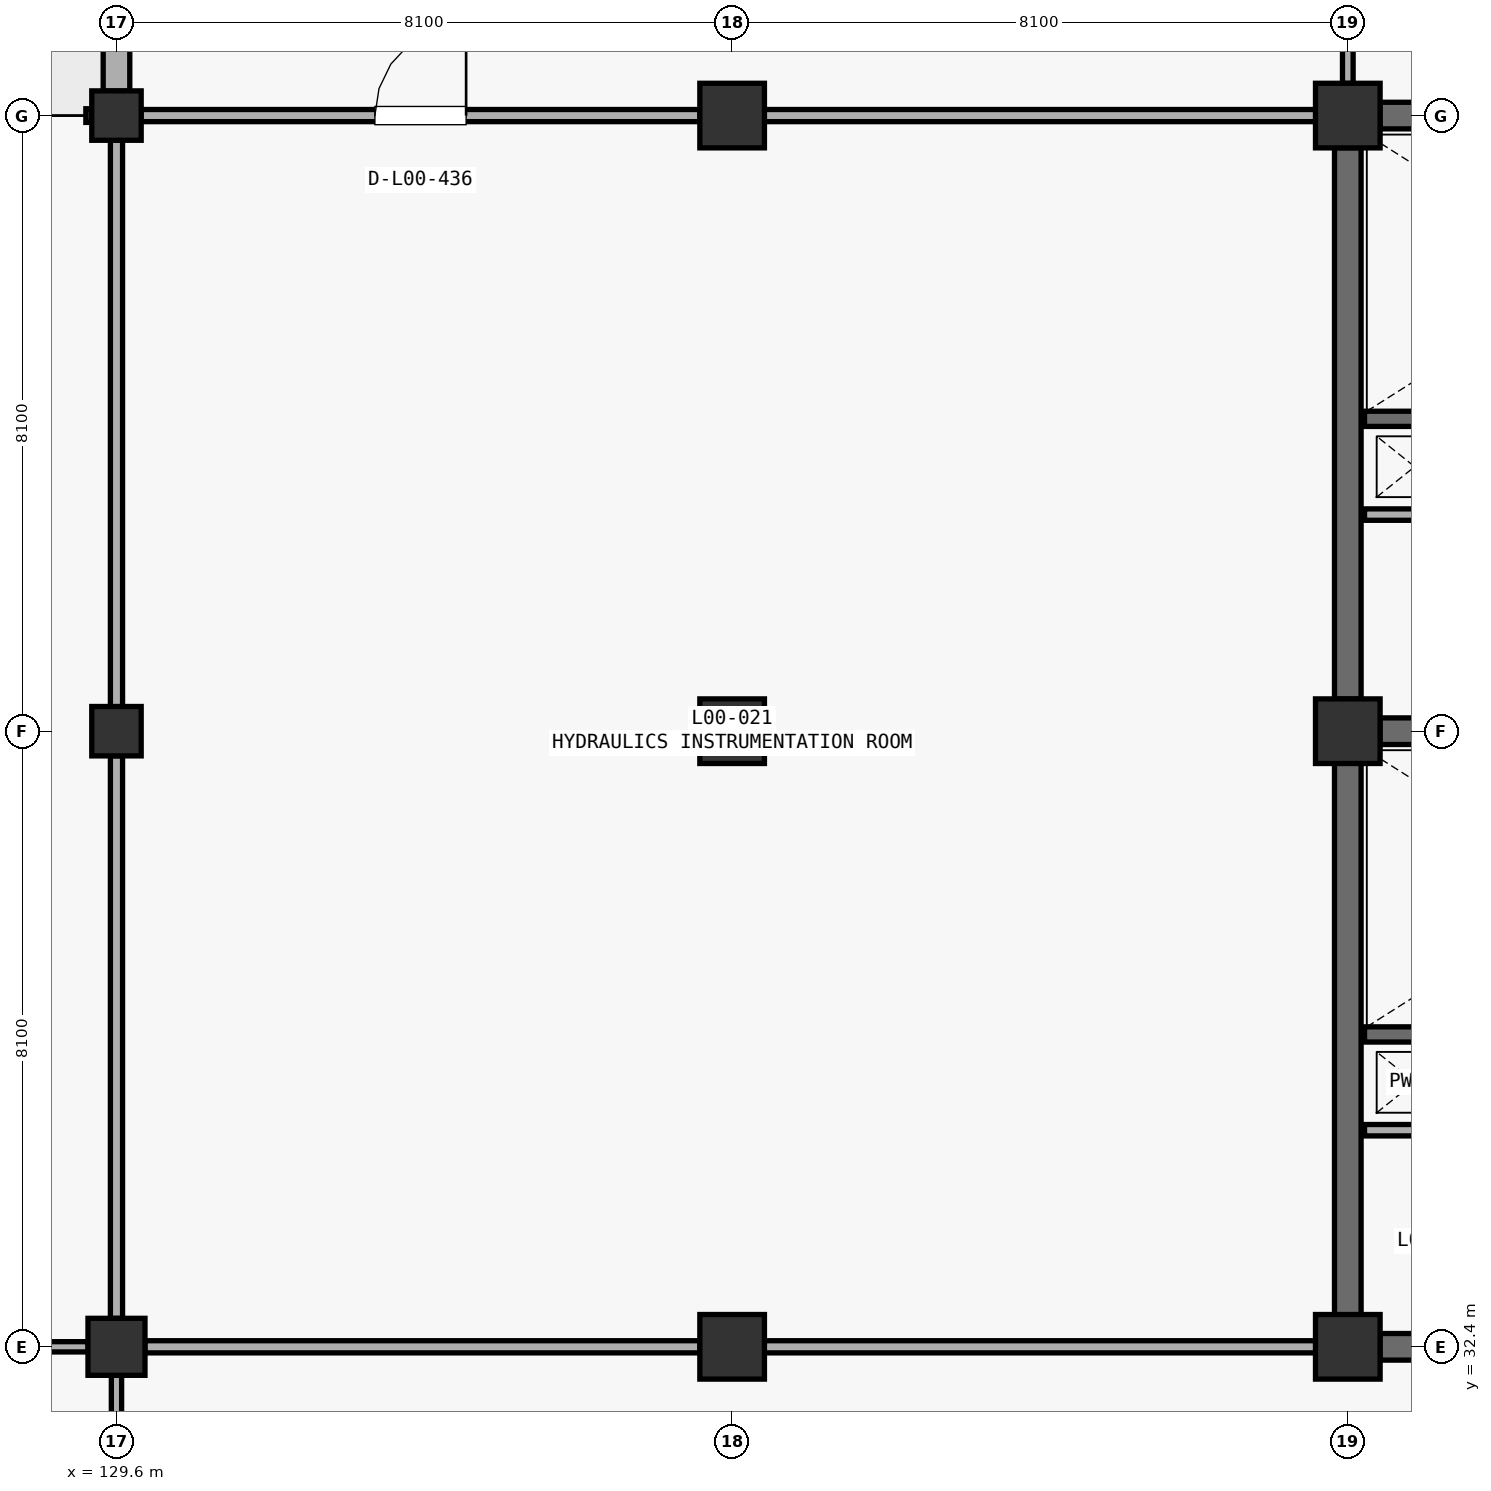
"""IFC4 building model, lengths in metres.
Left out: names, types, materials, properties, quantities, classifications, styles, units other than length and angle.
Written with IfcOpenShell. Run it as: python <this file> out.ifc"""

import sys

from ifc_helpers import new_model, si_unit, direction, frame, frame_2d, origin, origin_2d, place, context, subcontext, project, spatial, rectangle, circle, extrude, element, fill, save


model = new_model("IFC4")
c1 = context("Model", 3, precision=1e-05, world=origin(), true_north=direction((0.0, 1.0)))
c2 = subcontext(c1, "Body", "Model", "MODEL_VIEW")
j1 = project(units=[si_unit("LENGTHUNIT", "METRE"), si_unit("PLANEANGLEUNIT", "RADIAN")], contexts=[c1])
p1 = place(None, origin())
s1 = spatial("IfcSite", under=j1, at=p1, CompositionType="ELEMENT")
p2 = place(p1, origin())
s2 = spatial("IfcBuilding", under=s1, at=p2, CompositionType="ELEMENT")
p3 = place(p2, origin())
s3 = spatial("IfcBuildingStorey", under=s2, at=p3, CompositionType="ELEMENT", Elevation=0.0)
p4 = place(p3, frame((129.6, 32.4, 0.0), z_axis=(0.0, 0.0, 1.0), x_axis=(1.0, 0.0, 0.0)))
e1 = element("IfcColumn", 1, at=p4, inside=s3, PredefinedType="COLUMN", context=c2, shape_type="SweptSolid", body=[
    extrude(circle(Radius=0.375, at=origin_2d()), origin(), (0.0, 0.0, 1.0), 5.1),
])
for number, where, z_axis, x_axis in (
    (2, (129.6, 40.5, 0.0), (0.0, 0.0, 1.0), (1.0, 0.0, 0.0)),
    (3, (129.6, 48.6, 0.0), (0.0, 0.0, 1.0), (1.0, 0.0, 0.0)),
):
    element("IfcColumn", number, at=place(p3, frame(where, z_axis=z_axis, x_axis=x_axis)), inside=s3, PredefinedType="COLUMN", context=c2, shape_type="SweptSolid", body=[
        extrude(rectangle(XDim=0.65, YDim=0.65, at=origin_2d()), origin(), (0.0, 0.0, 1.0), 5.1),
    ])
for number, where, z_axis, x_axis in (
    (4, (137.7, 32.4, 0.0), (0.0, 0.0, 1.0), (1.0, 0.0, 0.0)),
    (5, (137.7, 40.5, 0.0), (0.0, 0.0, 1.0), (1.0, 0.0, 0.0)),
    (6, (137.7, 48.6, 0.0), (0.0, 0.0, 1.0), (1.0, 0.0, 0.0)),
    (7, (145.8, 32.4, 0.0), (0.0, 0.0, 1.0), (1.0, 0.0, 0.0)),
    (8, (145.8, 40.5, 0.0), (0.0, 0.0, 1.0), (1.0, 0.0, 0.0)),
    (9, (145.8, 48.6, 0.0), (0.0, 0.0, 1.0), (1.0, 0.0, 0.0)),
):
    element("IfcColumn", number, at=place(p3, frame(where, z_axis=z_axis, x_axis=x_axis)), inside=s3, PredefinedType="COLUMN", context=c2, shape_type="SweptSolid", body=[
        extrude(rectangle(XDim=0.85, YDim=0.85, at=origin_2d()), origin(), (0.0, 0.0, 1.0), 5.1),
    ])
p5 = place(p3, frame((129.6, 48.923, 0.0), z_axis=(0.0, 0.0, 1.0), x_axis=(0.0, 1.0, 0.0)))
e10 = element("IfcWall", 10, at=p5, inside=s3, PredefinedType="STANDARD", context=c2, shape_type="SweptSolid", body=[
    extrude(rectangle(XDim=7.454, YDim=0.35, at=frame_2d((3.727, 0.0))), origin(), (0.0, 0.0, 1.0), 3.872),
])
p6 = place(p5, frame((3.027, 0.0, 0.85)))
e11 = element("IfcOpeningElement", 11, at=p6, cuts=e10, PredefinedType="OPENING", context=c2, shape_type="SweptSolid", body=[
    extrude(rectangle(XDim=1.4, YDim=1.9, at=frame_2d((0.7, 0.95))), frame((0.0, 0.185, 0.0), z_axis=(0.0, -1.0, 0.0), x_axis=(1.0, 0.0, 0.0)), (0.0, 0.0, 1.0), 0.37),
])
p7 = place(p3, frame((146.223, 40.5, 0.0), z_axis=(0.0, 0.0, 1.0), x_axis=(1.0, 0.0, 0.0)))
e12 = element("IfcWall", 12, at=p7, inside=s3, PredefinedType="SHEAR", context=c2, shape_type="SweptSolid", body=[
    extrude(rectangle(XDim=7.254, YDim=0.35, at=frame_2d((3.627, 0.0))), origin(), (0.0, 0.0, 1.0), 4.822),
])
p8 = place(p3, frame((145.8, 32.823, 0.0), z_axis=(0.0, 0.0, 1.0), x_axis=(0.0, 1.0, 0.0)))
e13 = element("IfcWall", 13, at=p8, inside=s3, PredefinedType="SHEAR", context=c2, shape_type="SweptSolid", body=[
    extrude(rectangle(XDim=7.254, YDim=0.35, at=frame_2d((3.627, 0.0))), origin(), (0.0, 0.0, 1.0), 4.822),
])
p9 = place(p3, frame((146.223, 32.4, 0.0), z_axis=(0.0, 0.0, 1.0), x_axis=(1.0, 0.0, 0.0)))
e14 = element("IfcWall", 14, at=p9, inside=s3, PredefinedType="SHEAR", context=c2, shape_type="SweptSolid", body=[
    extrude(rectangle(XDim=7.254, YDim=0.35, at=frame_2d((3.627, 0.0))), origin(), (0.0, 0.0, 1.0), 4.822),
])
p10 = place(p3, frame((146.02, 36.51, 0.0), z_axis=(0.0, 0.0, 1.0), x_axis=(1.0, 0.0, 0.0)))
e15 = element("IfcWall", 15, at=p10, inside=s3, PredefinedType="SHEAR", context=c2, shape_type="SweptSolid", body=[
    extrude(rectangle(XDim=7.66, YDim=0.2, at=frame_2d((3.83, 0.0))), origin(), (0.0, 0.0, 1.0), 4.822),
])
p11 = place(p10, frame((6.11, 0.0, 0.0)))
e16 = element("IfcOpeningElement", 16, at=p11, cuts=e15, PredefinedType="OPENING", context=c2, shape_type="SweptSolid", body=[
    extrude(rectangle(XDim=1.15, YDim=2.2, at=frame_2d((0.575, 1.1))), frame((0.0, 0.11, 0.0), z_axis=(0.0, -1.0, 0.0), x_axis=(1.0, 0.0, 0.0)), (0.0, 0.0, 1.0), 0.22),
])
p12 = place(p3, frame((146.02, 35.25, 0.0), z_axis=(0.0, 0.0, 1.0), x_axis=(1.0, 0.0, 0.0)))
e17 = element("IfcWall", 17, at=p12, inside=s3, PredefinedType="PARTITIONING", context=c2, shape_type="SweptSolid", body=[
    extrude(rectangle(XDim=2.53, YDim=0.15, at=frame_2d((1.265, 0.0))), origin(), (0.0, 0.0, 1.0), 4.822),
])
p13 = place(p3, frame((146.223, 48.6, 0.0), z_axis=(0.0, 0.0, 1.0), x_axis=(1.0, 0.0, 0.0)))
e18 = element("IfcWall", 18, at=p13, inside=s3, PredefinedType="SHEAR", context=c2, shape_type="SweptSolid", body=[
    extrude(rectangle(XDim=7.254, YDim=0.35, at=frame_2d((3.627, 0.0))), origin(), (0.0, 0.0, 1.0), 4.822),
])
p14 = place(p3, frame((145.8, 40.923, 0.0), z_axis=(0.0, 0.0, 1.0), x_axis=(0.0, 1.0, 0.0)))
e19 = element("IfcWall", 19, at=p14, inside=s3, PredefinedType="SHEAR", context=c2, shape_type="SweptSolid", body=[
    extrude(rectangle(XDim=7.254, YDim=0.35, at=frame_2d((3.627, 0.0))), origin(), (0.0, 0.0, 1.0), 4.822),
])
p15 = place(p3, frame((146.02, 44.61, 0.0), z_axis=(0.0, 0.0, 1.0), x_axis=(1.0, 0.0, 0.0)))
e20 = element("IfcWall", 20, at=p15, inside=s3, PredefinedType="SHEAR", context=c2, shape_type="SweptSolid", body=[
    extrude(rectangle(XDim=7.66, YDim=0.2, at=frame_2d((3.83, 0.0))), origin(), (0.0, 0.0, 1.0), 4.822),
])
p16 = place(p15, frame((6.11, 0.0, 0.0)))
e21 = element("IfcOpeningElement", 21, at=p16, cuts=e20, PredefinedType="OPENING", context=c2, shape_type="SweptSolid", body=[
    extrude(rectangle(XDim=1.15, YDim=2.2, at=frame_2d((0.575, 1.1))), frame((0.0, 0.11, 0.0), z_axis=(0.0, -1.0, 0.0), x_axis=(1.0, 0.0, 0.0)), (0.0, 0.0, 1.0), 0.22),
])
p17 = place(p3, frame((146.02, 43.35, 0.0), z_axis=(0.0, 0.0, 1.0), x_axis=(1.0, 0.0, 0.0)))
e22 = element("IfcWall", 22, at=p17, inside=s3, PredefinedType="PARTITIONING", context=c2, shape_type="SweptSolid", body=[
    extrude(rectangle(XDim=2.53, YDim=0.15, at=frame_2d((1.265, 0.0))), origin(), (0.0, 0.0, 1.0), 4.822),
])
p18 = place(p3, frame((145.8, 49.023, 0.0), z_axis=(0.0, 0.0, 1.0), x_axis=(0.0, 1.0, 0.0)))
e23 = element("IfcWall", 23, at=p18, inside=s3, PredefinedType="PARTITIONING", context=c2, shape_type="SweptSolid", body=[
    extrude(rectangle(XDim=7.254, YDim=0.14, at=frame_2d((3.627, 0.0))), origin(), (0.0, 0.0, 1.0), 3.97),
])
p19 = place(p3, frame((121.823, 32.4, 0.0), z_axis=(0.0, 0.0, 1.0), x_axis=(1.0, 0.0, 0.0)))
e24 = element("IfcWall", 24, at=p19, inside=s3, PredefinedType="PARTITIONING", context=c2, shape_type="SweptSolid", body=[
    extrude(rectangle(XDim=7.404, YDim=0.135, at=frame_2d((3.702, 0.0))), origin(), (0.0, 0.0, 1.0), 4.273),
])
p20 = place(p3, frame((129.6, 24.623, 0.0), z_axis=(0.0, 0.0, 1.0), x_axis=(0.0, 1.0, 0.0)))
e25 = element("IfcWall", 25, at=p20, inside=s3, PredefinedType="PARTITIONING", context=c2, shape_type="SweptSolid", body=[
    extrude(rectangle(XDim=7.404, YDim=0.135, at=frame_2d((3.702, 0.0))), origin(), (0.0, 0.0, 1.0), 4.172),
])
p21 = place(p3, frame((129.973, 32.4, 0.0), z_axis=(0.0, 0.0, 1.0), x_axis=(1.0, 0.0, 0.0)))
e26 = element("IfcWall", 26, at=p21, inside=s3, PredefinedType="PARTITIONING", context=c2, shape_type="SweptSolid", body=[
    extrude(rectangle(XDim=7.304, YDim=0.16, at=frame_2d((3.652, 0.0))), origin(), (0.0, 0.0, 1.0), 4.172),
])
p22 = place(p3, frame((138.123, 32.4, 0.0), z_axis=(0.0, 0.0, 1.0), x_axis=(1.0, 0.0, 0.0)))
e27 = element("IfcWall", 27, at=p22, inside=s3, PredefinedType="PARTITIONING", context=c2, shape_type="SweptSolid", body=[
    extrude(rectangle(XDim=7.254, YDim=0.16, at=frame_2d((3.627, 0.0))), origin(), (0.0, 0.0, 1.0), 4.222),
])
p23 = place(p3, frame((129.923, 48.6, 0.0), z_axis=(0.0, 0.0, 1.0), x_axis=(1.0, 0.0, 0.0)))
e28 = element("IfcWall", 28, at=p23, inside=s3, PredefinedType="PARTITIONING", context=c2, shape_type="SweptSolid", body=[
    extrude(rectangle(XDim=7.354, YDim=0.16, at=frame_2d((3.677, 0.0))), origin(), (0.0, 0.0, 1.0), 3.972),
])
p24 = place(p23, frame((3.077, 0.0, 0.0)))
e29 = element("IfcOpeningElement", 29, at=p24, cuts=e28, PredefinedType="OPENING", context=c2, shape_type="SweptSolid", body=[
    extrude(rectangle(XDim=1.2, YDim=2.2, at=frame_2d((0.6, 1.1))), frame((0.0, 0.09, 0.0), z_axis=(0.0, -1.0, 0.0), x_axis=(1.0, 0.0, 0.0)), (0.0, 0.0, 1.0), 0.18),
])
p25 = place(p3, frame((138.123, 48.6, 0.0), z_axis=(0.0, 0.0, 1.0), x_axis=(1.0, 0.0, 0.0)))
e30 = element("IfcWall", 30, at=p25, inside=s3, PredefinedType="PARTITIONING", context=c2, shape_type="SweptSolid", body=[
    extrude(rectangle(XDim=7.254, YDim=0.16, at=frame_2d((3.627, 0.0))), origin(), (0.0, 0.0, 1.0), 3.872),
])
p26 = place(p3, frame((129.6, 32.773, 0.0), z_axis=(0.0, 0.0, 1.0), x_axis=(0.0, 1.0, 0.0)))
e31 = element("IfcWall", 31, at=p26, inside=s3, PredefinedType="PARTITIONING", context=c2, shape_type="SweptSolid", body=[
    extrude(rectangle(XDim=7.404, YDim=0.16, at=frame_2d((3.702, 0.0))), origin(), (0.0, 0.0, 1.0), 4.222),
])
p27 = place(p3, frame((129.6, 40.823, 0.0), z_axis=(0.0, 0.0, 1.0), x_axis=(0.0, 1.0, 0.0)))
e32 = element("IfcWall", 32, at=p27, inside=s3, PredefinedType="PARTITIONING", context=c2, shape_type="SweptSolid", body=[
    extrude(rectangle(XDim=7.454, YDim=0.16, at=frame_2d((3.727, 0.0))), origin(), (0.0, 0.0, 1.0), 3.972),
])
p28 = place(p24, origin())
e33 = element("IfcDoor", 33, at=p28, inside=s3, OperationType="SINGLE_SWING_RIGHT", PredefinedType="DOOR", context=c2, shape_type="SweptSolid", body=[
    extrude(rectangle(XDim=1.2, YDim=2.2, at=frame_2d((0.6, 1.1))), frame((0.0, 0.025, 0.0), z_axis=(0.0, -1.0, 0.0), x_axis=(1.0, 0.0, 0.0)), (0.0, 0.0, 1.0), 0.05),
])
fill(e29, e33)
save(model, sys.argv[1])
